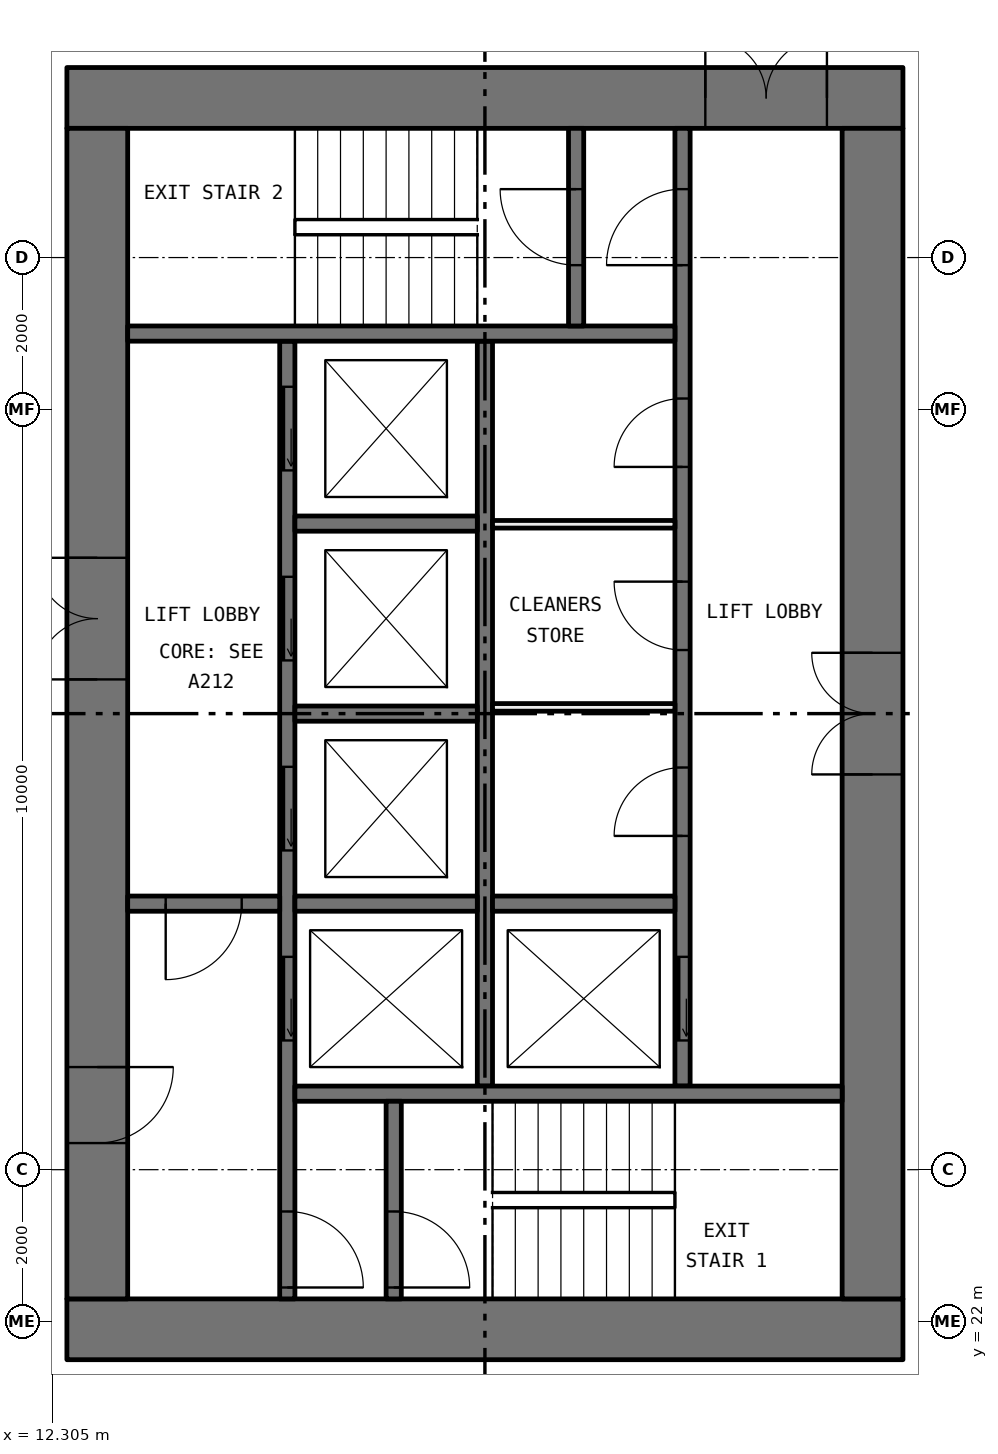
"""IFC4 building model, lengths in metres.
Left out: names, types, materials, properties, quantities, classifications, styles, units other than length and angle.
Written with IfcOpenShell. Run it as: python <this file> out.ifc"""

import sys

from ifc_helpers import new_model, si_unit, direction, frame, frame_2d, origin, place, context, subcontext, project, spatial, rectangle, extrude, element, fill, save


model = new_model("IFC4")
c1 = context("Model", 3, precision=1e-05, world=origin(), true_north=direction((0.0, 1.0)))
c2 = subcontext(c1, "Body", "Model", "MODEL_VIEW")
j1 = project(units=[si_unit("LENGTHUNIT", "METRE"), si_unit("PLANEANGLEUNIT", "RADIAN")], contexts=[c1])
p1 = place(None, origin())
s1 = spatial("IfcSite", under=j1, at=p1, CompositionType="ELEMENT")
p2 = place(p1, origin())
s2 = spatial("IfcBuilding", under=s1, at=p2, CompositionType="ELEMENT")
p3 = place(p2, frame((0.0, 0.0, 50.7)))
s3 = spatial("IfcBuildingStorey", under=s2, at=p3, CompositionType="ELEMENT", Elevation=50.7)
p4 = place(p3, frame((12.5, 21.9, 0.0), z_axis=(0.0, 0.0, 1.0), x_axis=(1.0, 0.0, 0.0)))
e1 = element("IfcWall", 1, at=p4, inside=s3, PredefinedType="SHEAR", context=c2, shape_type="SweptSolid", body=[
    extrude(rectangle(XDim=11.0, YDim=0.8, at=frame_2d((5.5, 0.0))), origin(), (0.0, 0.0, 1.0), 3.05),
])
p5 = place(p3, frame((12.5, 38.1, 0.0), z_axis=(0.0, 0.0, 1.0), x_axis=(1.0, 0.0, 0.0)))
e2 = element("IfcWall", 2, at=p5, inside=s3, PredefinedType="SHEAR", context=c2, shape_type="SweptSolid", body=[
    extrude(rectangle(XDim=11.0, YDim=0.8, at=frame_2d((5.5, 0.0))), origin(), (0.0, 0.0, 1.0), 3.05),
])
p6 = place(p5, frame((8.4, 0.0, 0.0)))
e3 = element("IfcOpeningElement", 3, at=p6, cuts=e2, PredefinedType="OPENING", context=c2, shape_type="SweptSolid", body=[
    extrude(rectangle(XDim=1.6, YDim=2.1, at=frame_2d((0.8, 1.05))), frame((0.0, 0.41, 0.0), z_axis=(0.0, -1.0, 0.0), x_axis=(1.0, 0.0, 0.0)), (0.0, 0.0, 1.0), 0.82),
])
p7 = place(p3, frame((12.9, 22.3, 0.0), z_axis=(0.0, 0.0, 1.0), x_axis=(0.0, 1.0, 0.0)))
e4 = element("IfcWall", 4, at=p7, inside=s3, PredefinedType="SHEAR", context=c2, shape_type="SweptSolid", body=[
    extrude(rectangle(XDim=15.4, YDim=0.8, at=frame_2d((7.7, 0.0))), origin(), (0.0, 0.0, 1.0), 3.05),
])
p8 = place(p7, frame((8.15, 0.0, 0.0)))
e5 = element("IfcOpeningElement", 5, at=p8, cuts=e4, PredefinedType="OPENING", context=c2, shape_type="SweptSolid", body=[
    extrude(rectangle(XDim=1.6, YDim=2.1, at=frame_2d((0.8, 1.05))), frame((0.0, 0.41, 0.0), z_axis=(0.0, -1.0, 0.0), x_axis=(1.0, 0.0, 0.0)), (0.0, 0.0, 1.0), 0.82),
])
p9 = place(p7, frame((2.05, 0.0, 0.0)))
e6 = element("IfcOpeningElement", 6, at=p9, cuts=e4, PredefinedType="OPENING", context=c2, shape_type="SweptSolid", body=[
    extrude(rectangle(XDim=1.0, YDim=2.1, at=frame_2d((0.5, 1.05))), frame((0.0, 0.41, 0.0), z_axis=(0.0, -1.0, 0.0), x_axis=(1.0, 0.0, 0.0)), (0.0, 0.0, 1.0), 0.82),
])
p10 = place(p3, frame((23.1, 22.3, 0.0), z_axis=(0.0, 0.0, 1.0), x_axis=(0.0, 1.0, 0.0)))
e7 = element("IfcWall", 7, at=p10, inside=s3, PredefinedType="SHEAR", context=c2, shape_type="SweptSolid", body=[
    extrude(rectangle(XDim=15.4, YDim=0.8, at=frame_2d((7.7, 0.0))), origin(), (0.0, 0.0, 1.0), 3.05),
])
p11 = place(p10, frame((6.9, 0.0, 0.0)))
e8 = element("IfcOpeningElement", 8, at=p11, cuts=e7, PredefinedType="OPENING", context=c2, shape_type="SweptSolid", body=[
    extrude(rectangle(XDim=1.6, YDim=2.1, at=frame_2d((0.8, 1.05))), frame((0.0, 0.41, 0.0), z_axis=(0.0, -1.0, 0.0), x_axis=(1.0, 0.0, 0.0)), (0.0, 0.0, 1.0), 0.82),
])
p12 = place(p3, frame((15.4, 22.3, 0.0), z_axis=(0.0, 0.0, 1.0), x_axis=(0.0, 1.0, 0.0)))
e9 = element("IfcWall", 9, at=p12, inside=s3, PredefinedType="SOLIDWALL", context=c2, shape_type="SweptSolid", body=[
    extrude(rectangle(XDim=12.6, YDim=0.2, at=frame_2d((6.3, 0.0))), origin(), (0.0, 0.0, 1.0), 3.05),
])
p13 = place(p12, frame((3.4, 0.0, 0.0)))
e10 = element("IfcOpeningElement", 10, at=p13, cuts=e9, PredefinedType="OPENING", context=c2, shape_type="SweptSolid", body=[
    extrude(rectangle(XDim=1.1, YDim=2.1, at=frame_2d((0.55, 1.05))), frame((0.0, 0.11, 0.0), z_axis=(0.0, -1.0, 0.0), x_axis=(1.0, 0.0, 0.0)), (0.0, 0.0, 1.0), 0.22),
])
p14 = place(p12, frame((5.9, 0.0, 0.0)))
e11 = element("IfcOpeningElement", 11, at=p14, cuts=e9, PredefinedType="OPENING", context=c2, shape_type="SweptSolid", body=[
    extrude(rectangle(XDim=1.1, YDim=2.1, at=frame_2d((0.55, 1.05))), frame((0.0, 0.11, 0.0), z_axis=(0.0, -1.0, 0.0), x_axis=(1.0, 0.0, 0.0)), (0.0, 0.0, 1.0), 0.22),
])
p15 = place(p12, frame((8.4, 0.0, 0.0)))
e12 = element("IfcOpeningElement", 12, at=p15, cuts=e9, PredefinedType="OPENING", context=c2, shape_type="SweptSolid", body=[
    extrude(rectangle(XDim=1.1, YDim=2.1, at=frame_2d((0.55, 1.05))), frame((0.0, 0.11, 0.0), z_axis=(0.0, -1.0, 0.0), x_axis=(1.0, 0.0, 0.0)), (0.0, 0.0, 1.0), 0.22),
])
p16 = place(p12, frame((10.9, 0.0, 0.0)))
e13 = element("IfcOpeningElement", 13, at=p16, cuts=e9, PredefinedType="OPENING", context=c2, shape_type="SweptSolid", body=[
    extrude(rectangle(XDim=1.1, YDim=2.1, at=frame_2d((0.55, 1.05))), frame((0.0, 0.11, 0.0), z_axis=(0.0, -1.0, 0.0), x_axis=(1.0, 0.0, 0.0)), (0.0, 0.0, 1.0), 0.22),
])
p17 = place(p12, frame((0.15, 0.0, 0.0)))
e14 = element("IfcOpeningElement", 14, at=p17, cuts=e9, PredefinedType="OPENING", context=c2, shape_type="SweptSolid", body=[
    extrude(rectangle(XDim=1.0, YDim=2.1, at=frame_2d((0.5, 1.05))), frame((0.0, 0.11, 0.0), z_axis=(0.0, -1.0, 0.0), x_axis=(1.0, 0.0, 0.0)), (0.0, 0.0, 1.0), 0.22),
])
p18 = place(p3, frame((20.6, 25.1, 0.0), z_axis=(0.0, 0.0, 1.0), x_axis=(0.0, 1.0, 0.0)))
e15 = element("IfcWall", 15, at=p18, inside=s3, PredefinedType="SOLIDWALL", context=c2, shape_type="SweptSolid", body=[
    extrude(rectangle(XDim=12.6, YDim=0.2, at=frame_2d((6.3, 0.0))), origin(), (0.0, 0.0, 1.0), 3.05),
])
p19 = place(p18, frame((0.6, 0.0, 0.0)))
e16 = element("IfcOpeningElement", 16, at=p19, cuts=e15, PredefinedType="OPENING", context=c2, shape_type="SweptSolid", body=[
    extrude(rectangle(XDim=1.1, YDim=2.1, at=frame_2d((0.55, 1.05))), frame((0.0, 0.11, 0.0), z_axis=(0.0, -1.0, 0.0), x_axis=(1.0, 0.0, 0.0)), (0.0, 0.0, 1.0), 0.22),
])
p20 = place(p18, frame((10.8, 0.0, 0.0)))
e17 = element("IfcOpeningElement", 17, at=p20, cuts=e15, PredefinedType="OPENING", context=c2, shape_type="SweptSolid", body=[
    extrude(rectangle(XDim=1.0, YDim=2.1, at=frame_2d((0.5, 1.05))), frame((0.0, 0.11, 0.0), z_axis=(0.0, -1.0, 0.0), x_axis=(1.0, 0.0, 0.0)), (0.0, 0.0, 1.0), 0.22),
])
p21 = place(p18, frame((3.291, 0.0, 0.0)))
e18 = element("IfcOpeningElement", 18, at=p21, cuts=e15, PredefinedType="OPENING", context=c2, shape_type="SweptSolid", body=[
    extrude(rectangle(XDim=0.9, YDim=2.1, at=frame_2d((0.45, 1.05))), frame((0.0, 0.11, 0.0), z_axis=(0.0, -1.0, 0.0), x_axis=(1.0, 0.0, 0.0)), (0.0, 0.0, 1.0), 0.22),
])
p22 = place(p18, frame((5.737, 0.0, 0.0)))
e19 = element("IfcOpeningElement", 19, at=p22, cuts=e15, PredefinedType="OPENING", context=c2, shape_type="SweptSolid", body=[
    extrude(rectangle(XDim=0.9, YDim=2.1, at=frame_2d((0.45, 1.05))), frame((0.0, 0.11, 0.0), z_axis=(0.0, -1.0, 0.0), x_axis=(1.0, 0.0, 0.0)), (0.0, 0.0, 1.0), 0.22),
])
p23 = place(p18, frame((8.146, 0.0, 0.0)))
e20 = element("IfcOpeningElement", 20, at=p23, cuts=e15, PredefinedType="OPENING", context=c2, shape_type="SweptSolid", body=[
    extrude(rectangle(XDim=0.9, YDim=2.1, at=frame_2d((0.45, 1.05))), frame((0.0, 0.11, 0.0), z_axis=(0.0, -1.0, 0.0), x_axis=(1.0, 0.0, 0.0)), (0.0, 0.0, 1.0), 0.22),
])
p24 = place(p3, frame((18.0, 25.1, 0.0), z_axis=(0.0, 0.0, 1.0), x_axis=(0.0, 1.0, 0.0)))
e21 = element("IfcWall", 21, at=p24, inside=s3, PredefinedType="SOLIDWALL", context=c2, shape_type="SweptSolid", body=[
    extrude(rectangle(XDim=9.8, YDim=0.2, at=frame_2d((4.9, 0.0))), origin(), (0.0, 0.0, 1.0), 3.05),
])
for number, where, z_axis, x_axis in (
    (22, (15.5, 25.0, 0.0), (0.0, 0.0, 1.0), (1.0, 0.0, 0.0)),
    (23, (13.3, 35.0, 0.0), (0.0, 0.0, 1.0), (1.0, 0.0, 0.0)),
):
    element("IfcWall", number, at=place(p3, frame(where, z_axis=z_axis, x_axis=x_axis)), inside=s3, PredefinedType="SOLIDWALL", context=c2, shape_type="SweptSolid", body=[
        extrude(rectangle(XDim=7.2, YDim=0.2, at=frame_2d((3.6, 0.0))), origin(), (0.0, 0.0, 1.0), 3.05),
    ])
p25 = place(p3, frame((13.3, 27.5, 0.0), z_axis=(0.0, 0.0, 1.0), x_axis=(1.0, 0.0, 0.0)))
e24 = element("IfcWall", 24, at=p25, inside=s3, PredefinedType="SOLIDWALL", context=c2, shape_type="SweptSolid", body=[
    extrude(rectangle(XDim=2.0, YDim=0.2, at=frame_2d((1.0, 0.0))), origin(), (0.0, 0.0, 1.0), 3.05),
])
p26 = place(p25, frame((0.5, 0.0, 0.0)))
e25 = element("IfcOpeningElement", 25, at=p26, cuts=e24, PredefinedType="OPENING", context=c2, shape_type="SweptSolid", body=[
    extrude(rectangle(XDim=1.0, YDim=2.1, at=frame_2d((0.5, 1.05))), frame((0.0, 0.11, 0.0), z_axis=(0.0, -1.0, 0.0), x_axis=(1.0, 0.0, 0.0)), (0.0, 0.0, 1.0), 0.22),
])
p27 = place(p3, frame((16.8, 22.3, 0.0), z_axis=(0.0, 0.0, 1.0), x_axis=(0.0, 1.0, 0.0)))
e26 = element("IfcWall", 26, at=p27, inside=s3, PredefinedType="SOLIDWALL", context=c2, shape_type="SweptSolid", body=[
    extrude(rectangle(XDim=2.6, YDim=0.2, at=frame_2d((1.3, 0.0))), origin(), (0.0, 0.0, 1.0), 3.05),
])
p28 = place(p27, frame((0.15, 0.0, 0.0)))
e27 = element("IfcOpeningElement", 27, at=p28, cuts=e26, PredefinedType="OPENING", context=c2, shape_type="SweptSolid", body=[
    extrude(rectangle(XDim=1.0, YDim=2.1, at=frame_2d((0.5, 1.05))), frame((0.0, 0.11, 0.0), z_axis=(0.0, -1.0, 0.0), x_axis=(1.0, 0.0, 0.0)), (0.0, 0.0, 1.0), 0.22),
])
p29 = place(p3, frame((19.2, 35.1, 0.0), z_axis=(0.0, 0.0, 1.0), x_axis=(0.0, 1.0, 0.0)))
e28 = element("IfcWall", 28, at=p29, inside=s3, PredefinedType="SOLIDWALL", context=c2, shape_type="SweptSolid", body=[
    extrude(rectangle(XDim=2.6, YDim=0.2, at=frame_2d((1.3, 0.0))), origin(), (0.0, 0.0, 1.0), 3.05),
])
p30 = place(p29, frame((0.8, 0.0, 0.0)))
e29 = element("IfcOpeningElement", 29, at=p30, cuts=e28, PredefinedType="OPENING", context=c2, shape_type="SweptSolid", body=[
    extrude(rectangle(XDim=1.0, YDim=2.1, at=frame_2d((0.5, 1.05))), frame((0.0, 0.11, 0.0), z_axis=(0.0, -1.0, 0.0), x_axis=(1.0, 0.0, 0.0)), (0.0, 0.0, 1.0), 0.22),
])
for number, where, z_axis, x_axis in (
    (30, (15.5, 27.5, 0.0), (0.0, 0.0, 1.0), (1.0, 0.0, 0.0)),
    (31, (15.5, 30.0, 0.0), (0.0, 0.0, 1.0), (1.0, 0.0, 0.0)),
    (32, (15.5, 32.5, 0.0), (0.0, 0.0, 1.0), (1.0, 0.0, 0.0)),
    (33, (18.1, 27.5, 0.0), (0.0, 0.0, 1.0), (1.0, 0.0, 0.0)),
):
    element("IfcWall", number, at=place(p3, frame(where, z_axis=z_axis, x_axis=x_axis)), inside=s3, PredefinedType="SOLIDWALL", context=c2, shape_type="SweptSolid", body=[
        extrude(rectangle(XDim=2.4, YDim=0.2, at=frame_2d((1.2, 0.0))), origin(), (0.0, 0.0, 1.0), 3.05),
    ])
for number, where, z_axis, x_axis in (
    (34, (18.1, 30.082, 0.0), (0.0, 0.0, 1.0), (1.0, 0.0, 0.0)),
    (35, (18.1, 32.491, 0.0), (0.0, 0.0, 1.0), (1.0, 0.0, 0.0)),
):
    element("IfcWall", number, at=place(p3, frame(where, z_axis=z_axis, x_axis=x_axis)), inside=s3, PredefinedType="PARTITIONING", context=c2, shape_type="SweptSolid", body=[
        extrude(rectangle(XDim=2.4, YDim=0.1, at=frame_2d((1.2, 0.0))), origin(), (0.0, 0.0, 1.0), 3.05),
    ])
p31 = place(p19, origin())
e36 = element("IfcDoor", 36, at=p31, inside=s3, OperationType="SLIDING_TO_LEFT", PredefinedType="DOOR", context=c2, shape_type="SweptSolid", body=[
    extrude(rectangle(XDim=1.1, YDim=2.1, at=frame_2d((0.55, 1.05))), frame((0.0, 0.025, 0.0), z_axis=(0.0, -1.0, 0.0), x_axis=(1.0, 0.0, 0.0)), (0.0, 0.0, 1.0), 0.05),
])
fill(e16, e36)
p32 = place(p13, origin())
e37 = element("IfcDoor", 37, at=p32, inside=s3, OperationType="SLIDING_TO_LEFT", PredefinedType="DOOR", context=c2, shape_type="SweptSolid", body=[
    extrude(rectangle(XDim=1.1, YDim=2.1, at=frame_2d((0.55, 1.05))), frame((0.0, 0.025, 0.0), z_axis=(0.0, -1.0, 0.0), x_axis=(1.0, 0.0, 0.0)), (0.0, 0.0, 1.0), 0.05),
])
fill(e10, e37)
p33 = place(p14, origin())
e38 = element("IfcDoor", 38, at=p33, inside=s3, OperationType="SLIDING_TO_LEFT", PredefinedType="DOOR", context=c2, shape_type="SweptSolid", body=[
    extrude(rectangle(XDim=1.1, YDim=2.1, at=frame_2d((0.55, 1.05))), frame((0.0, 0.025, 0.0), z_axis=(0.0, -1.0, 0.0), x_axis=(1.0, 0.0, 0.0)), (0.0, 0.0, 1.0), 0.05),
])
fill(e11, e38)
p34 = place(p15, origin())
e39 = element("IfcDoor", 39, at=p34, inside=s3, OperationType="SLIDING_TO_LEFT", PredefinedType="DOOR", context=c2, shape_type="SweptSolid", body=[
    extrude(rectangle(XDim=1.1, YDim=2.1, at=frame_2d((0.55, 1.05))), frame((0.0, 0.025, 0.0), z_axis=(0.0, -1.0, 0.0), x_axis=(1.0, 0.0, 0.0)), (0.0, 0.0, 1.0), 0.05),
])
fill(e12, e39)
p35 = place(p16, origin())
e40 = element("IfcDoor", 40, at=p35, inside=s3, OperationType="SLIDING_TO_LEFT", PredefinedType="DOOR", context=c2, shape_type="SweptSolid", body=[
    extrude(rectangle(XDim=1.1, YDim=2.1, at=frame_2d((0.55, 1.05))), frame((0.0, 0.025, 0.0), z_axis=(0.0, -1.0, 0.0), x_axis=(1.0, 0.0, 0.0)), (0.0, 0.0, 1.0), 0.05),
])
fill(e13, e40)
p36 = place(p28, frame((1.0, 0.0, 0.0), x_axis=(-1.0, 0.0, 0.0)))
e41 = element("IfcDoor", 41, at=p36, inside=s3, OperationType="SINGLE_SWING_LEFT", PredefinedType="DOOR", context=c2, shape_type="SweptSolid", body=[
    extrude(rectangle(XDim=1.0, YDim=2.1, at=frame_2d((0.5, 1.05))), frame((0.0, 0.025, 0.0), z_axis=(0.0, -1.0, 0.0), x_axis=(1.0, 0.0, 0.0)), (0.0, 0.0, 1.0), 0.05),
])
fill(e27, e41)
p37 = place(p17, frame((1.0, 0.0, 0.0), x_axis=(-1.0, 0.0, 0.0)))
e42 = element("IfcDoor", 42, at=p37, inside=s3, OperationType="SINGLE_SWING_LEFT", PredefinedType="DOOR", context=c2, shape_type="SweptSolid", body=[
    extrude(rectangle(XDim=1.0, YDim=2.1, at=frame_2d((0.5, 1.05))), frame((0.0, 0.025, 0.0), z_axis=(0.0, -1.0, 0.0), x_axis=(1.0, 0.0, 0.0)), (0.0, 0.0, 1.0), 0.05),
])
fill(e14, e42)
p38 = place(p20, origin())
e43 = element("IfcDoor", 43, at=p38, inside=s3, OperationType="SINGLE_SWING_RIGHT", PredefinedType="DOOR", context=c2, shape_type="SweptSolid", body=[
    extrude(rectangle(XDim=1.0, YDim=2.1, at=frame_2d((0.5, 1.05))), frame((0.0, 0.025, 0.0), z_axis=(0.0, -1.0, 0.0), x_axis=(1.0, 0.0, 0.0)), (0.0, 0.0, 1.0), 0.05),
])
fill(e17, e43)
p39 = place(p30, origin())
e44 = element("IfcDoor", 44, at=p39, inside=s3, OperationType="SINGLE_SWING_LEFT", PredefinedType="DOOR", context=c2, shape_type="SweptSolid", body=[
    extrude(rectangle(XDim=1.0, YDim=2.1, at=frame_2d((0.5, 1.05))), frame((0.0, 0.025, 0.0), z_axis=(0.0, -1.0, 0.0), x_axis=(1.0, 0.0, 0.0)), (0.0, 0.0, 1.0), 0.05),
])
fill(e29, e44)
p40 = place(p26, frame((1.0, 0.0, 0.0), x_axis=(-1.0, 0.0, 0.0)))
e45 = element("IfcDoor", 45, at=p40, inside=s3, OperationType="SINGLE_SWING_LEFT", PredefinedType="DOOR", context=c2, shape_type="SweptSolid", body=[
    extrude(rectangle(XDim=1.0, YDim=2.1, at=frame_2d((0.5, 1.05))), frame((0.0, 0.025, 0.0), z_axis=(0.0, -1.0, 0.0), x_axis=(1.0, 0.0, 0.0)), (0.0, 0.0, 1.0), 0.05),
])
fill(e25, e45)
p41 = place(p8, origin())
e46 = element("IfcDoor", 46, at=p41, inside=s3, OperationType="DOUBLE_DOOR_SINGLE_SWING", PredefinedType="DOOR", context=c2, shape_type="SweptSolid", body=[
    extrude(rectangle(XDim=1.6, YDim=2.1, at=frame_2d((0.8, 1.05))), frame((0.0, 0.025, 0.0), z_axis=(0.0, -1.0, 0.0), x_axis=(1.0, 0.0, 0.0)), (0.0, 0.0, 1.0), 0.05),
])
fill(e5, e46)
p42 = place(p9, frame((1.0, 0.0, 0.0), x_axis=(-1.0, 0.0, 0.0)))
e47 = element("IfcDoor", 47, at=p42, inside=s3, OperationType="SINGLE_SWING_RIGHT", PredefinedType="DOOR", context=c2, shape_type="SweptSolid", body=[
    extrude(rectangle(XDim=1.0, YDim=2.1, at=frame_2d((0.5, 1.05))), frame((0.0, 0.025, 0.0), z_axis=(0.0, -1.0, 0.0), x_axis=(1.0, 0.0, 0.0)), (0.0, 0.0, 1.0), 0.05),
])
fill(e6, e47)
p43 = place(p6, origin())
e48 = element("IfcDoor", 48, at=p43, inside=s3, OperationType="DOUBLE_DOOR_SINGLE_SWING", PredefinedType="DOOR", context=c2, shape_type="SweptSolid", body=[
    extrude(rectangle(XDim=1.6, YDim=2.1, at=frame_2d((0.8, 1.05))), frame((0.0, 0.025, 0.0), z_axis=(0.0, -1.0, 0.0), x_axis=(1.0, 0.0, 0.0)), (0.0, 0.0, 1.0), 0.05),
])
fill(e3, e48)
p44 = place(p11, origin())
e49 = element("IfcDoor", 49, at=p44, inside=s3, OperationType="DOUBLE_DOOR_SINGLE_SWING", PredefinedType="DOOR", context=c2, shape_type="SweptSolid", body=[
    extrude(rectangle(XDim=1.6, YDim=2.1, at=frame_2d((0.8, 1.05))), frame((0.0, 0.025, 0.0), z_axis=(0.0, -1.0, 0.0), x_axis=(1.0, 0.0, 0.0)), (0.0, 0.0, 1.0), 0.05),
])
fill(e8, e49)
p45 = place(p21, origin())
e50 = element("IfcDoor", 50, at=p45, inside=s3, OperationType="SINGLE_SWING_RIGHT", PredefinedType="DOOR", context=c2, shape_type="SweptSolid", body=[
    extrude(rectangle(XDim=0.9, YDim=2.1, at=frame_2d((0.45, 1.05))), frame((0.0, 0.025, 0.0), z_axis=(0.0, -1.0, 0.0), x_axis=(1.0, 0.0, 0.0)), (0.0, 0.0, 1.0), 0.05),
])
fill(e18, e50)
p46 = place(p22, origin())
e51 = element("IfcDoor", 51, at=p46, inside=s3, OperationType="SINGLE_SWING_LEFT", PredefinedType="DOOR", context=c2, shape_type="SweptSolid", body=[
    extrude(rectangle(XDim=0.9, YDim=2.1, at=frame_2d((0.45, 1.05))), frame((0.0, 0.025, 0.0), z_axis=(0.0, -1.0, 0.0), x_axis=(1.0, 0.0, 0.0)), (0.0, 0.0, 1.0), 0.05),
])
fill(e19, e51)
p47 = place(p23, origin())
e52 = element("IfcDoor", 52, at=p47, inside=s3, OperationType="SINGLE_SWING_RIGHT", PredefinedType="DOOR", context=c2, shape_type="SweptSolid", body=[
    extrude(rectangle(XDim=0.9, YDim=2.1, at=frame_2d((0.45, 1.05))), frame((0.0, 0.025, 0.0), z_axis=(0.0, -1.0, 0.0), x_axis=(1.0, 0.0, 0.0)), (0.0, 0.0, 1.0), 0.05),
])
fill(e20, e52)
save(model, sys.argv[1])
